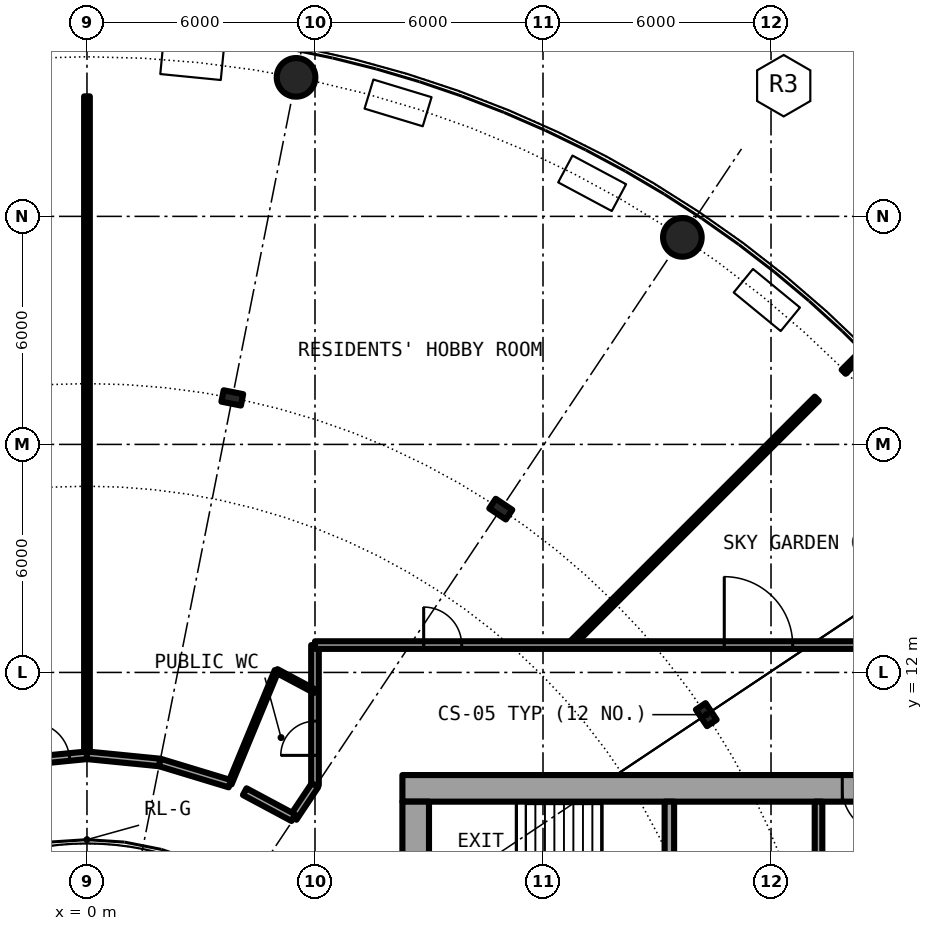
"""IFC4 building model, lengths in metres.
Left out: names, types, materials, properties, quantities, classifications, styles, units other than length and angle.
Written with IfcOpenShell. Run it as: python <this file> out.ifc"""

import sys

from ifc_helpers import new_model, si_unit, direction, frame, frame_2d, origin, origin_2d, place, context, subcontext, project, spatial, rectangle, hollow_circle, i_section, extrude, element, fill, save


model = new_model("IFC4")
c1 = context("Model", 3, precision=1e-05, world=origin(), true_north=direction((0.0, 1.0)))
c2 = subcontext(c1, "Body", "Model", "MODEL_VIEW")
j1 = project(units=[si_unit("LENGTHUNIT", "METRE"), si_unit("PLANEANGLEUNIT", "RADIAN")], contexts=[c1])
p1 = place(None, origin())
s1 = spatial("IfcSite", under=j1, at=p1, CompositionType="ELEMENT")
p2 = place(p1, origin())
s2 = spatial("IfcBuilding", under=s1, at=p2, CompositionType="ELEMENT")
p3 = place(p2, frame((0.0, 0.0, 97.15)))
s3 = spatial("IfcBuildingStorey", under=s2, at=p3, CompositionType="ELEMENT", Elevation=97.15)
for number, where, z_axis, x_axis in (
    (1, (15.667, 23.448, 0.0), (0.0, 0.0, 1.0), (1.0, 0.0, 0.0)),
    (2, (5.501, 27.658, 0.0), (0.0, 0.0, 1.0), (1.0, 0.0, 0.0)),
):
    element("IfcColumn", number, at=place(p3, frame(where, z_axis=z_axis, x_axis=x_axis)), inside=s3, PredefinedType="COLUMN", context=c2, shape_type="SweptSolid", body=[
        extrude(hollow_circle(Radius=0.508, WallThickness=0.04, at=origin_2d()), origin(), (0.0, 0.0, 1.0), 6.1),
    ])
for number, where, z_axis, x_axis in (
    (3, (16.297, 10.889, 0.0), (0.0, 0.0, 1.0), (0.831, 0.556, 0.0)),
    (4, (10.889, 16.297, 0.0), (0.0, 0.0, 1.0), (0.556, 0.831, 0.0)),
    (5, (3.824, 19.223, 0.0), (0.0, 0.0, 1.0), (0.195, 0.981, 0.0)),
):
    element("IfcColumn", number, at=place(p3, frame(where, z_axis=z_axis, x_axis=x_axis)), inside=s3, PredefinedType="COLUMN", context=c2, shape_type="SweptSolid", body=[
        extrude(i_section(OverallWidth=0.306, OverallDepth=0.524, WebThickness=0.021, FlangeThickness=0.04, FilletRadius=0.027, at=origin_2d()), origin(), (0.0, 0.0, 1.0), 6.1),
    ])
p4 = place(p3, frame((22.3, 8.95, 0.0), z_axis=(0.0, 0.0, 1.0), x_axis=(-1.0, 0.0, 0.0)))
e6 = element("IfcWall", 6, at=p4, inside=s3, PredefinedType="SHEAR", context=c2, shape_type="SweptSolid", body=[
    extrude(rectangle(XDim=14.0, YDim=0.7, at=frame_2d((7.0, 0.0))), origin(), (0.0, 0.0, 1.0), 6.1),
])
p5 = place(p4, frame((1.225, 0.0, 0.0)))
e7 = element("IfcOpeningElement", 7, at=p5, cuts=e6, PredefinedType="OPENING", context=c2, shape_type="SweptSolid", body=[
    extrude(rectangle(XDim=1.2, YDim=2.3, at=frame_2d((0.6, 1.15))), frame((0.0, 0.36, 0.0), z_axis=(0.0, -1.0, 0.0), x_axis=(1.0, 0.0, 0.0)), (0.0, 0.0, 1.0), 0.72),
])
p6 = place(p3, frame((8.65, -8.6, 0.0), z_axis=(0.0, 0.0, 1.0), x_axis=(0.0, 1.0, 0.0)))
e8 = element("IfcWall", 8, at=p6, inside=s3, PredefinedType="SHEAR", context=c2, shape_type="SweptSolid", body=[
    extrude(rectangle(XDim=17.2, YDim=0.7, at=frame_2d((8.6, 0.0))), origin(), (0.0, 0.0, 1.0), 6.1),
])
p7 = place(p6, frame((7.4, 0.0, 0.1)))
e9 = element("IfcOpeningElement", 9, at=p7, cuts=e8, PredefinedType="OPENING", context=c2, shape_type="SweptSolid", body=[
    extrude(rectangle(XDim=2.4, YDim=2.2, at=frame_2d((1.2, 1.1))), frame((0.0, 0.36, 0.0), z_axis=(0.0, -1.0, 0.0), x_axis=(1.0, 0.0, 0.0)), (0.0, 0.0, 1.0), 0.72),
])
p8 = place(p3, frame((15.325, 4.65, 0.0), z_axis=(0.0, 0.0, 1.0), x_axis=(0.0, 1.0, 0.0)))
e10 = element("IfcWall", 10, at=p8, inside=s3, PredefinedType="SHEAR", context=c2, shape_type="SweptSolid", body=[
    extrude(rectangle(XDim=3.95, YDim=0.25, at=frame_2d((1.975, 0.0))), origin(), (0.0, 0.0, 1.0), 6.1),
])
p9 = place(p8, frame((1.375, 0.0, 0.0)))
e11 = element("IfcOpeningElement", 11, at=p9, cuts=e10, PredefinedType="OPENING", context=c2, shape_type="SweptSolid", body=[
    extrude(rectangle(XDim=1.2, YDim=2.3, at=frame_2d((0.6, 1.15))), frame((0.0, 0.135, 0.0), z_axis=(0.0, -1.0, 0.0), x_axis=(1.0, 0.0, 0.0)), (0.0, 0.0, 1.0), 0.27),
])
p10 = place(p3, frame((19.25, 1.575, 0.0), z_axis=(0.0, 0.0, 1.0), x_axis=(0.0, 1.0, 0.0)))
e12 = element("IfcWall", 12, at=p10, inside=s3, PredefinedType="SOLIDWALL", context=c2, shape_type="SweptSolid", body=[
    extrude(rectangle(XDim=7.025, YDim=0.2, at=frame_2d((3.513, 0.0))), origin(), (0.0, 0.0, 1.0), 5.7),
])
p11 = place(p10, frame((4.475, 0.0, 0.0)))
e13 = element("IfcOpeningElement", 13, at=p11, cuts=e12, PredefinedType="OPENING", context=c2, shape_type="SweptSolid", body=[
    extrude(rectangle(XDim=1.1, YDim=2.3, at=frame_2d((0.55, 1.15))), frame((0.0, 0.11, 0.0), z_axis=(0.0, -1.0, 0.0), x_axis=(1.0, 0.0, 0.0)), (0.0, 0.0, 1.0), 0.22),
])
p12 = place(p3, frame((6.0, 9.034, 0.0), z_axis=(0.0, 0.0, 1.0), x_axis=(0.0, 1.0, 0.0)))
e14 = element("IfcWall", 14, at=p12, inside=s3, PredefinedType="PARTITIONING", context=c2, shape_type="SweptSolid", body=[
    extrude(rectangle(XDim=3.686, YDim=0.2, at=frame_2d((1.843, 0.0))), origin(), (0.0, 0.0, 1.0), 5.7),
])
p13 = place(p12, frame((0.784, 0.0, 0.0)))
e15 = element("IfcOpeningElement", 15, at=p13, cuts=e14, PredefinedType="OPENING", context=c2, shape_type="SweptSolid", body=[
    extrude(rectangle(XDim=0.9, YDim=2.3, at=frame_2d((0.45, 1.15))), frame((0.0, 0.11, 0.0), z_axis=(0.0, -1.0, 0.0), x_axis=(1.0, 0.0, 0.0)), (0.0, 0.0, 1.0), 0.22),
])
p14 = place(p3, frame((0.0, 9.82, 0.0), z_axis=(0.0, 0.0, 1.0), x_axis=(0.0, 1.0, 0.0)))
e16 = element("IfcWall", 16, at=p14, inside=s3, PredefinedType="PARTITIONING", context=c2, shape_type="SweptSolid", body=[
    extrude(rectangle(XDim=17.338, YDim=0.15, at=frame_2d((8.669, 0.0))), origin(), (0.0, 0.0, 1.0), 5.7),
])
p15 = place(p3, frame((3.758, 9.072, 0.0), z_axis=(0.0, 0.0, 1.0), x_axis=(0.382517205945, 0.923948368231, 0.0)))
e17 = element("IfcWall", 17, at=p15, inside=s3, PredefinedType="PARTITIONING", context=c2, shape_type="SweptSolid", body=[
    extrude(rectangle(XDim=3.216, YDim=0.1, at=frame_2d((1.608, 0.0))), origin(), (0.0, 0.0, 1.0), 5.7),
])
p16 = place(p3, frame((12.72, 12.72, 0.0), z_axis=(0.0, 0.0, 1.0), x_axis=(0.707106781187, 0.707106781187, 0.0)))
e18 = element("IfcWall", 18, at=p16, inside=s3, PredefinedType="PARTITIONING", context=c2, shape_type="SweptSolid", body=[
    extrude(rectangle(XDim=9.17, YDim=0.15, at=frame_2d((4.585, 0.0))), origin(), (0.0, 0.0, 1.0), 5.7),
])
p17 = place(p3, frame((19.911, 19.911, 0.0), z_axis=(0.0, 0.0, 1.0), x_axis=(0.707106781187, 0.707106781187, 0.0)))
e19 = element("IfcWall", 19, at=p17, inside=s3, PredefinedType="PARTITIONING", context=c2, shape_type="SweptSolid", body=[
    extrude(rectangle(XDim=0.642, YDim=0.15, at=frame_2d((0.321, 0.0))), origin(), (0.0, 0.0, 1.0), 5.7),
])
p18 = place(p3, frame((5.429, 8.179, 0.0), z_axis=(0.0, 0.0, 1.0), x_axis=(0.555412364489, 0.831575075007, 0.0)))
e20 = element("IfcWall", 20, at=p18, inside=s3, PredefinedType="PARTITIONING", context=c2, shape_type="SweptSolid", body=[
    extrude(rectangle(XDim=1.028, YDim=0.2, at=frame_2d((0.514, 0.0))), origin(), (0.0, 0.0, 1.0), 5.7),
])
p19 = place(p3, frame((-1.916, 9.631, 0.0), z_axis=(0.0, 0.0, 1.0), x_axis=(0.995171860647, 0.098147683504, 0.0)))
e21 = element("IfcWall", 21, at=p19, inside=s3, PredefinedType="PARTITIONING", context=c2, shape_type="SweptSolid", body=[
    extrude(rectangle(XDim=1.925, YDim=0.2, at=frame_2d((0.963, 0.0))), origin(), (0.0, 0.0, 1.0), 5.7),
])
p20 = place(p19, frame((0.463, 0.0, 0.0)))
e22 = element("IfcOpeningElement", 22, at=p20, cuts=e21, PredefinedType="OPENING", context=c2, shape_type="SweptSolid", body=[
    extrude(rectangle(XDim=1.0, YDim=2.3, at=frame_2d((0.5, 1.15))), frame((0.0, 0.11, 0.0), z_axis=(0.0, -1.0, 0.0), x_axis=(1.0, 0.0, 0.0)), (0.0, 0.0, 1.0), 0.22),
])
p21 = place(p3, frame((0.0, 9.82, 0.0), z_axis=(0.0, 0.0, 1.0), x_axis=(0.995171860647, -0.098147683504, 0.0)))
e23 = element("IfcWall", 23, at=p21, inside=s3, PredefinedType="PARTITIONING", context=c2, shape_type="SweptSolid", body=[
    extrude(rectangle(XDim=1.925, YDim=0.2, at=frame_2d((0.963, 0.0))), origin(), (0.0, 0.0, 1.0), 5.7),
])
p22 = place(p3, frame((1.916, 9.631, 0.0), z_axis=(0.0, 0.0, 1.0), x_axis=(0.956896312675, -0.29042976223, 0.0)))
e24 = element("IfcWall", 24, at=p22, inside=s3, PredefinedType="PARTITIONING", context=c2, shape_type="SweptSolid", body=[
    extrude(rectangle(XDim=1.925, YDim=0.2, at=frame_2d((0.962, 0.0))), origin(), (0.0, 0.0, 1.0), 5.7),
])
p23 = place(p3, frame((4.151, 8.863, 0.0), z_axis=(0.0, 0.0, 1.0), x_axis=(0.881652665802, -0.471898905364, 0.0)))
e25 = element("IfcWall", 25, at=p23, inside=s3, PredefinedType="PARTITIONING", context=c2, shape_type="SweptSolid", body=[
    extrude(rectangle(XDim=1.45, YDim=0.2, at=frame_2d((0.725, 0.0))), origin(), (0.0, 0.0, 1.0), 5.7),
])
p24 = place(p3, frame((6.0, 12.72, 0.0), z_axis=(0.0, 0.0, 1.0), x_axis=(1.0, 0.0, 0.0)))
e26 = element("IfcWall", 26, at=p24, inside=s3, PredefinedType="PARTITIONING", context=c2, shape_type="SweptSolid", body=[
    extrude(rectangle(XDim=15.9, YDim=0.2, at=frame_2d((7.95, 0.0))), origin(), (0.0, 0.0, 1.0), 5.7),
])
p25 = place(p24, frame((2.86, 0.0, 0.0)))
e27 = element("IfcOpeningElement", 27, at=p25, cuts=e26, PredefinedType="OPENING", context=c2, shape_type="SweptSolid", body=[
    extrude(rectangle(XDim=1.0, YDim=2.3, at=frame_2d((0.5, 1.15))), frame((0.0, 0.11, 0.0), z_axis=(0.0, -1.0, 0.0), x_axis=(1.0, 0.0, 0.0)), (0.0, 0.0, 1.0), 0.22),
])
p26 = place(p24, frame((10.77, 0.0, 0.0)))
e28 = element("IfcOpeningElement", 28, at=p26, cuts=e26, PredefinedType="OPENING", context=c2, shape_type="SweptSolid", body=[
    extrude(rectangle(XDim=1.8, YDim=2.3, at=frame_2d((0.9, 1.15))), frame((0.0, 0.11, 0.0), z_axis=(0.0, -1.0, 0.0), x_axis=(1.0, 0.0, 0.0)), (0.0, 0.0, 1.0), 0.22),
])
p27 = place(p3, frame((4.988, 12.043, 0.0), z_axis=(0.0, 0.0, 1.0), x_axis=(0.882235076446, -0.470809165042, 0.0)))
e29 = element("IfcWall", 29, at=p27, inside=s3, PredefinedType="PARTITIONING", context=c2, shape_type="SweptSolid", body=[
    extrude(rectangle(XDim=1.147, YDim=0.1, at=frame_2d((0.573, 0.0))), origin(), (0.0, 0.0, 1.0), 5.7),
])
p28 = place(p5, origin())
e30 = element("IfcDoor", 30, at=p28, inside=s3, OperationType="SINGLE_SWING_RIGHT", PredefinedType="DOOR", context=c2, shape_type="SweptSolid", body=[
    extrude(rectangle(XDim=1.2, YDim=2.3, at=frame_2d((0.6, 1.15))), frame((0.0, 0.025, 0.0), z_axis=(0.0, -1.0, 0.0), x_axis=(1.0, 0.0, 0.0)), (0.0, 0.0, 1.0), 0.05),
])
fill(e7, e30)
p29 = place(p13, origin())
e31 = element("IfcDoor", 31, at=p29, inside=s3, OperationType="SINGLE_SWING_LEFT", PredefinedType="DOOR", context=c2, shape_type="SweptSolid", body=[
    extrude(rectangle(XDim=0.9, YDim=2.3, at=frame_2d((0.45, 1.15))), frame((0.0, 0.025, 0.0), z_axis=(0.0, -1.0, 0.0), x_axis=(1.0, 0.0, 0.0)), (0.0, 0.0, 1.0), 0.05),
])
fill(e15, e31)
p30 = place(p25, origin())
e32 = element("IfcDoor", 32, at=p30, inside=s3, OperationType="SINGLE_SWING_LEFT", PredefinedType="DOOR", context=c2, shape_type="SweptSolid", body=[
    extrude(rectangle(XDim=1.0, YDim=2.3, at=frame_2d((0.5, 1.15))), frame((0.0, 0.025, 0.0), z_axis=(0.0, -1.0, 0.0), x_axis=(1.0, 0.0, 0.0)), (0.0, 0.0, 1.0), 0.05),
])
fill(e27, e32)
p31 = place(p20, origin())
e33 = element("IfcDoor", 33, at=p31, inside=s3, OperationType="SINGLE_SWING_LEFT", PredefinedType="DOOR", context=c2, shape_type="SweptSolid", body=[
    extrude(rectangle(XDim=1.0, YDim=2.3, at=frame_2d((0.5, 1.15))), frame((0.0, 0.025, 0.0), z_axis=(0.0, -1.0, 0.0), x_axis=(1.0, 0.0, 0.0)), (0.0, 0.0, 1.0), 0.05),
])
fill(e22, e33)
p32 = place(p26, origin())
e34 = element("IfcDoor", 34, at=p32, inside=s3, OperationType="DOUBLE_DOOR_SINGLE_SWING", PredefinedType="DOOR", context=c2, shape_type="SweptSolid", body=[
    extrude(rectangle(XDim=1.8, YDim=2.3, at=frame_2d((0.9, 1.15))), frame((0.0, 0.025, 0.0), z_axis=(0.0, -1.0, 0.0), x_axis=(1.0, 0.0, 0.0)), (0.0, 0.0, 1.0), 0.05),
])
fill(e28, e34)
save(model, sys.argv[1])
